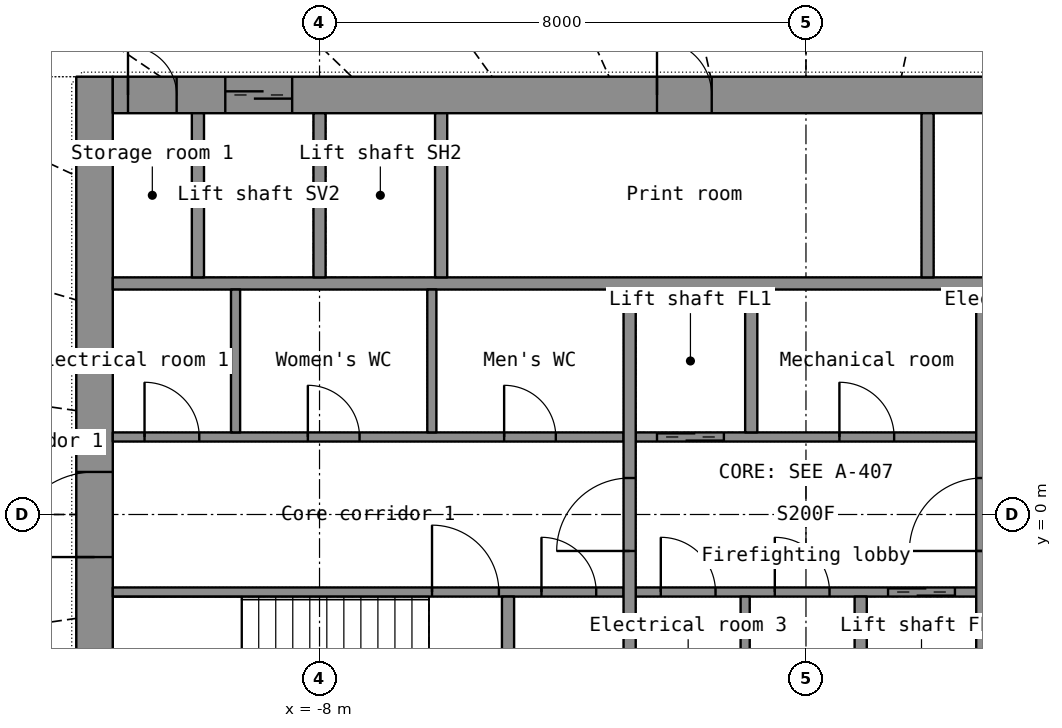
"""IFC4 building model, lengths in metres.
Left out: names, types, materials, properties, quantities, classifications, styles, units other than length and angle.
Written with IfcOpenShell. Run it as: python <this file> out.ifc"""

import sys

from ifc_helpers import new_model, si_unit, direction, frame, frame_2d, origin, place, context, subcontext, project, spatial, rectangle, extrude, element, fill, save


model = new_model("IFC4")
c1 = context("Model", 3, precision=1e-05, world=origin(), true_north=direction((0.0, 1.0)))
c2 = subcontext(c1, "Body", "Model", "MODEL_VIEW")
j1 = project(units=[si_unit("LENGTHUNIT", "METRE"), si_unit("PLANEANGLEUNIT", "RADIAN")], contexts=[c1])
p1 = place(None, origin())
s1 = spatial("IfcSite", under=j1, at=p1, CompositionType="ELEMENT")
p2 = place(p1, origin())
s2 = spatial("IfcBuilding", under=s1, at=p2, CompositionType="ELEMENT")
p3 = place(p2, frame((0.0, 0.0, 32.9)))
s3 = spatial("IfcBuildingStorey", under=s2, at=p3, CompositionType="ELEMENT", Elevation=32.9)
p4 = place(p3, frame((-11.7, -7.2, 0.0), z_axis=(0.0, 0.0, 1.0), x_axis=(0.0, 1.0, 0.0)))
e1 = element("IfcWall", 1, at=p4, inside=s3, PredefinedType="SHEAR", context=c2, shape_type="SweptSolid", body=[
    extrude(rectangle(XDim=14.4, YDim=0.6, at=frame_2d((7.2, 0.0))), origin(), (0.0, 0.0, 1.0), 3.8),
])
p5 = place(p4, frame((6.5, 0.0, 0.0)))
e2 = element("IfcOpeningElement", 2, at=p5, cuts=e1, PredefinedType="OPENING", context=c2, shape_type="SweptSolid", body=[
    extrude(rectangle(XDim=1.4, YDim=2.2, at=frame_2d((0.7, 1.1))), frame((0.0, 0.31, 0.0), z_axis=(0.0, -1.0, 0.0), x_axis=(1.0, 0.0, 0.0)), (0.0, 0.0, 1.0), 0.62),
])
p6 = place(p3, frame((-11.4, 6.9, 0.0), z_axis=(0.0, 0.0, 1.0), x_axis=(1.0, 0.0, 0.0)))
e3 = element("IfcWall", 3, at=p6, inside=s3, PredefinedType="SHEAR", context=c2, shape_type="SweptSolid", body=[
    extrude(rectangle(XDim=22.8, YDim=0.6, at=frame_2d((11.4, 0.0))), origin(), (0.0, 0.0, 1.0), 3.8),
])
p7 = place(p6, frame((1.85, 0.0, 0.0)))
e4 = element("IfcOpeningElement", 4, at=p7, cuts=e3, PredefinedType="OPENING", context=c2, shape_type="SweptSolid", body=[
    extrude(rectangle(XDim=1.1, YDim=2.2, at=frame_2d((0.55, 1.1))), frame((0.0, 0.31, 0.0), z_axis=(0.0, -1.0, 0.0), x_axis=(1.0, 0.0, 0.0)), (0.0, 0.0, 1.0), 0.62),
])
p8 = place(p6, frame((8.95, 0.0, 0.0)))
e5 = element("IfcOpeningElement", 5, at=p8, cuts=e3, PredefinedType="OPENING", context=c2, shape_type="SweptSolid", body=[
    extrude(rectangle(XDim=0.9, YDim=2.1, at=frame_2d((0.45, 1.05))), frame((0.0, 0.31, 0.0), z_axis=(0.0, -1.0, 0.0), x_axis=(1.0, 0.0, 0.0)), (0.0, 0.0, 1.0), 0.62),
])
p9 = place(p6, frame((16.95, 0.0, 0.0)))
e6 = element("IfcOpeningElement", 6, at=p9, cuts=e3, PredefinedType="OPENING", context=c2, shape_type="SweptSolid", body=[
    extrude(rectangle(XDim=0.9, YDim=2.1, at=frame_2d((0.45, 1.05))), frame((0.0, 0.31, 0.0), z_axis=(0.0, -1.0, 0.0), x_axis=(1.0, 0.0, 0.0)), (0.0, 0.0, 1.0), 0.62),
])
p10 = place(p6, frame((0.25, 0.0, 0.0)))
e7 = element("IfcOpeningElement", 7, at=p10, cuts=e3, PredefinedType="OPENING", context=c2, shape_type="SweptSolid", body=[
    extrude(rectangle(XDim=0.8, YDim=2.05, at=frame_2d((0.4, 1.025))), frame((0.0, 0.31, 0.0), z_axis=(0.0, -1.0, 0.0), x_axis=(1.0, 0.0, 0.0)), (0.0, 0.0, 1.0), 0.62),
])
p11 = place(p6, frame((21.75, 0.0, 0.0)))
e8 = element("IfcOpeningElement", 8, at=p11, cuts=e3, PredefinedType="OPENING", context=c2, shape_type="SweptSolid", body=[
    extrude(rectangle(XDim=0.8, YDim=2.05, at=frame_2d((0.4, 1.025))), frame((0.0, 0.31, 0.0), z_axis=(0.0, -1.0, 0.0), x_axis=(1.0, 0.0, 0.0)), (0.0, 0.0, 1.0), 0.62),
])
p12 = place(p3, frame((-11.4, 3.8, 0.0), z_axis=(0.0, 0.0, 1.0), x_axis=(1.0, 0.0, 0.0)))
e9 = element("IfcWall", 9, at=p12, inside=s3, PredefinedType="SHEAR", context=c2, shape_type="SweptSolid", body=[
    extrude(rectangle(XDim=22.8, YDim=0.2, at=frame_2d((11.4, 0.0))), origin(), (0.0, 0.0, 1.0), 3.8),
])
for number, where, z_axis, x_axis in (
    (10, (-10.0, 3.9, 0.0), (0.0, 0.0, 1.0), (0.0, 1.0, 0.0)),
    (11, (-8.0, 3.9, 0.0), (0.0, 0.0, 1.0), (0.0, 1.0, 0.0)),
    (12, (-6.0, 3.9, 0.0), (0.0, 0.0, 1.0), (0.0, 1.0, 0.0)),
):
    element("IfcWall", number, at=place(p3, frame(where, z_axis=z_axis, x_axis=x_axis)), inside=s3, PredefinedType="SHEAR", context=c2, shape_type="SweptSolid", body=[
        extrude(rectangle(XDim=2.7, YDim=0.2, at=frame_2d((1.35, 0.0))), origin(), (0.0, 0.0, 1.0), 3.8),
    ])
p13 = place(p3, frame((2.0, 3.9, 0.0), z_axis=(0.0, 0.0, 1.0), x_axis=(0.0, 1.0, 0.0)))
e13 = element("IfcWall", 13, at=p13, inside=s3, PredefinedType="PARTITIONING", context=c2, shape_type="SweptSolid", body=[
    extrude(rectangle(XDim=2.7, YDim=0.2, at=frame_2d((1.35, 0.0))), origin(), (0.0, 0.0, 1.0), 3.8),
])
p14 = place(p3, frame((-11.4, -1.275, 0.0), z_axis=(0.0, 0.0, 1.0), x_axis=(1.0, 0.0, 0.0)))
e14 = element("IfcWall", 14, at=p14, inside=s3, PredefinedType="SHEAR", context=c2, shape_type="SweptSolid", body=[
    extrude(rectangle(XDim=8.4, YDim=0.15, at=frame_2d((4.2, 0.0))), origin(), (0.0, 0.0, 1.0), 3.8),
])
p15 = place(p14, frame((5.25, 0.0, 0.0)))
e15 = element("IfcOpeningElement", 15, at=p15, cuts=e14, PredefinedType="OPENING", context=c2, shape_type="SweptSolid", body=[
    extrude(rectangle(XDim=1.1, YDim=2.15, at=frame_2d((0.55, 1.075))), frame((0.0, 0.085, 0.0), z_axis=(0.0, -1.0, 0.0), x_axis=(1.0, 0.0, 0.0)), (0.0, 0.0, 1.0), 0.17),
])
p16 = place(p14, frame((7.05, 0.0, 0.0)))
e16 = element("IfcOpeningElement", 16, at=p16, cuts=e14, PredefinedType="OPENING", context=c2, shape_type="SweptSolid", body=[
    extrude(rectangle(XDim=0.9, YDim=2.1, at=frame_2d((0.45, 1.05))), frame((0.0, 0.085, 0.0), z_axis=(0.0, -1.0, 0.0), x_axis=(1.0, 0.0, 0.0)), (0.0, 0.0, 1.0), 0.17),
])
p17 = place(p3, frame((-2.8, -1.275, 0.0), z_axis=(0.0, 0.0, 1.0), x_axis=(1.0, 0.0, 0.0)))
e17 = element("IfcWall", 17, at=p17, inside=s3, PredefinedType="SHEAR", context=c2, shape_type="SweptSolid", body=[
    extrude(rectangle(XDim=5.6, YDim=0.15, at=frame_2d((2.8, 0.0))), origin(), (0.0, 0.0, 1.0), 3.8),
])
p18 = place(p17, frame((4.15, 0.0, 0.0)))
e18 = element("IfcOpeningElement", 18, at=p18, cuts=e17, PredefinedType="OPENING", context=c2, shape_type="SweptSolid", body=[
    extrude(rectangle(XDim=1.1, YDim=2.2, at=frame_2d((0.55, 1.1))), frame((0.0, 0.085, 0.0), z_axis=(0.0, -1.0, 0.0), x_axis=(1.0, 0.0, 0.0)), (0.0, 0.0, 1.0), 0.17),
])
p19 = place(p17, frame((0.413, 0.0, 0.0)))
e19 = element("IfcOpeningElement", 19, at=p19, cuts=e17, PredefinedType="OPENING", context=c2, shape_type="SweptSolid", body=[
    extrude(rectangle(XDim=0.9, YDim=2.1, at=frame_2d((0.45, 1.05))), frame((0.0, 0.085, 0.0), z_axis=(0.0, -1.0, 0.0), x_axis=(1.0, 0.0, 0.0)), (0.0, 0.0, 1.0), 0.17),
])
p20 = place(p17, frame((2.288, 0.0, 0.0)))
e20 = element("IfcOpeningElement", 20, at=p20, cuts=e17, PredefinedType="OPENING", context=c2, shape_type="SweptSolid", body=[
    extrude(rectangle(XDim=0.9, YDim=2.1, at=frame_2d((0.45, 1.05))), frame((0.0, 0.085, 0.0), z_axis=(0.0, -1.0, 0.0), x_axis=(1.0, 0.0, 0.0)), (0.0, 0.0, 1.0), 0.17),
])
p21 = place(p3, frame((-11.4, 1.275, 0.0), z_axis=(0.0, 0.0, 1.0), x_axis=(1.0, 0.0, 0.0)))
e21 = element("IfcWall", 21, at=p21, inside=s3, PredefinedType="PARTITIONING", context=c2, shape_type="SweptSolid", body=[
    extrude(rectangle(XDim=8.4, YDim=0.15, at=frame_2d((4.2, 0.0))), origin(), (0.0, 0.0, 1.0), 3.8),
])
p22 = place(p21, frame((0.522, 0.0, 0.0)))
e22 = element("IfcOpeningElement", 22, at=p22, cuts=e21, PredefinedType="OPENING", context=c2, shape_type="SweptSolid", body=[
    extrude(rectangle(XDim=0.9, YDim=2.1, at=frame_2d((0.45, 1.05))), frame((0.0, 0.085, 0.0), z_axis=(0.0, -1.0, 0.0), x_axis=(1.0, 0.0, 0.0)), (0.0, 0.0, 1.0), 0.17),
])
p23 = place(p21, frame((3.208, 0.0, 0.0)))
e23 = element("IfcOpeningElement", 23, at=p23, cuts=e21, PredefinedType="OPENING", context=c2, shape_type="SweptSolid", body=[
    extrude(rectangle(XDim=0.85, YDim=2.1, at=frame_2d((0.425, 1.05))), frame((0.0, 0.085, 0.0), z_axis=(0.0, -1.0, 0.0), x_axis=(1.0, 0.0, 0.0)), (0.0, 0.0, 1.0), 0.17),
])
p24 = place(p21, frame((6.436, 0.0, 0.0)))
e24 = element("IfcOpeningElement", 24, at=p24, cuts=e21, PredefinedType="OPENING", context=c2, shape_type="SweptSolid", body=[
    extrude(rectangle(XDim=0.85, YDim=2.1, at=frame_2d((0.425, 1.05))), frame((0.0, 0.085, 0.0), z_axis=(0.0, -1.0, 0.0), x_axis=(1.0, 0.0, 0.0)), (0.0, 0.0, 1.0), 0.17),
])
p25 = place(p3, frame((-2.8, 1.275, 0.0), z_axis=(0.0, 0.0, 1.0), x_axis=(1.0, 0.0, 0.0)))
e25 = element("IfcWall", 25, at=p25, inside=s3, PredefinedType="SHEAR", context=c2, shape_type="SweptSolid", body=[
    extrude(rectangle(XDim=5.6, YDim=0.15, at=frame_2d((2.8, 0.0))), origin(), (0.0, 0.0, 1.0), 3.8),
])
p26 = place(p25, frame((0.35, 0.0, 0.0)))
e26 = element("IfcOpeningElement", 26, at=p26, cuts=e25, PredefinedType="OPENING", context=c2, shape_type="SweptSolid", body=[
    extrude(rectangle(XDim=1.1, YDim=2.2, at=frame_2d((0.55, 1.1))), frame((0.0, 0.085, 0.0), z_axis=(0.0, -1.0, 0.0), x_axis=(1.0, 0.0, 0.0)), (0.0, 0.0, 1.0), 0.17),
])
p27 = place(p25, frame((3.35, 0.0, 0.0)))
e27 = element("IfcOpeningElement", 27, at=p27, cuts=e25, PredefinedType="OPENING", context=c2, shape_type="SweptSolid", body=[
    extrude(rectangle(XDim=0.9, YDim=2.1, at=frame_2d((0.45, 1.05))), frame((0.0, 0.085, 0.0), z_axis=(0.0, -1.0, 0.0), x_axis=(1.0, 0.0, 0.0)), (0.0, 0.0, 1.0), 0.17),
])
p28 = place(p3, frame((-2.9, -3.7, 0.0), z_axis=(0.0, 0.0, 1.0), x_axis=(0.0, 1.0, 0.0)))
e28 = element("IfcWall", 28, at=p28, inside=s3, PredefinedType="SHEAR", context=c2, shape_type="SweptSolid", body=[
    extrude(rectangle(XDim=7.4, YDim=0.2, at=frame_2d((3.7, 0.0))), origin(), (0.0, 0.0, 1.0), 3.8),
])
p29 = place(p28, frame((3.1, 0.0, 0.0)))
e29 = element("IfcOpeningElement", 29, at=p29, cuts=e28, PredefinedType="OPENING", context=c2, shape_type="SweptSolid", body=[
    extrude(rectangle(XDim=1.2, YDim=2.2, at=frame_2d((0.6, 1.1))), frame((0.0, 0.11, 0.0), z_axis=(0.0, -1.0, 0.0), x_axis=(1.0, 0.0, 0.0)), (0.0, 0.0, 1.0), 0.22),
])
p30 = place(p3, frame((2.9, -3.7, 0.0), z_axis=(0.0, 0.0, 1.0), x_axis=(0.0, 1.0, 0.0)))
e30 = element("IfcWall", 30, at=p30, inside=s3, PredefinedType="SHEAR", context=c2, shape_type="SweptSolid", body=[
    extrude(rectangle(XDim=7.4, YDim=0.2, at=frame_2d((3.7, 0.0))), origin(), (0.0, 0.0, 1.0), 3.8),
])
p31 = place(p30, frame((3.1, 0.0, 0.0)))
e31 = element("IfcOpeningElement", 31, at=p31, cuts=e30, PredefinedType="OPENING", context=c2, shape_type="SweptSolid", body=[
    extrude(rectangle(XDim=1.2, YDim=2.2, at=frame_2d((0.6, 1.1))), frame((0.0, 0.11, 0.0), z_axis=(0.0, -1.0, 0.0), x_axis=(1.0, 0.0, 0.0)), (0.0, 0.0, 1.0), 0.22),
])
for number, where, z_axis, x_axis in (
    (32, (-0.9, 1.35, 0.0), (0.0, 0.0, 1.0), (0.0, 1.0, 0.0)),
    (33, (0.9, -3.7, 0.0), (0.0, 0.0, 1.0), (0.0, 1.0, 0.0)),
    (34, (-4.9, -3.7, 0.0), (0.0, 0.0, 1.0), (0.0, 1.0, 0.0)),
):
    element("IfcWall", number, at=place(p3, frame(where, z_axis=z_axis, x_axis=x_axis)), inside=s3, PredefinedType="SHEAR", context=c2, shape_type="SweptSolid", body=[
        extrude(rectangle(XDim=2.35, YDim=0.2, at=frame_2d((1.175, 0.0))), origin(), (0.0, 0.0, 1.0), 3.8),
    ])
for number, where, z_axis, x_axis in (
    (35, (-9.381, 1.35, 0.0), (0.0, 0.0, 1.0), (0.0, 1.0, 0.0)),
    (36, (-6.153, 1.35, 0.0), (0.0, 0.0, 1.0), (0.0, 1.0, 0.0)),
    (37, (-1.0, -3.7, 0.0), (0.0, 0.0, 1.0), (0.0, 1.0, 0.0)),
):
    element("IfcWall", number, at=place(p3, frame(where, z_axis=z_axis, x_axis=x_axis)), inside=s3, PredefinedType="PARTITIONING", context=c2, shape_type="SweptSolid", body=[
        extrude(rectangle(XDim=2.35, YDim=0.15, at=frame_2d((1.175, 0.0))), origin(), (0.0, 0.0, 1.0), 3.8),
    ])
p32 = place(p7, origin())
e38 = element("IfcDoor", 38, at=p32, inside=s3, OperationType="DOUBLE_DOOR_SLIDING", PredefinedType="DOOR", context=c2, shape_type="SweptSolid", body=[
    extrude(rectangle(XDim=1.1, YDim=2.2, at=frame_2d((0.55, 1.1))), frame((0.0, 0.025, 0.0), z_axis=(0.0, -1.0, 0.0), x_axis=(1.0, 0.0, 0.0)), (0.0, 0.0, 1.0), 0.05),
])
fill(e4, e38)
p33 = place(p8, origin())
e39 = element("IfcDoor", 39, at=p33, inside=s3, OperationType="SINGLE_SWING_LEFT", PredefinedType="DOOR", context=c2, shape_type="SweptSolid", body=[
    extrude(rectangle(XDim=0.9, YDim=2.1, at=frame_2d((0.45, 1.05))), frame((0.0, 0.025, 0.0), z_axis=(0.0, -1.0, 0.0), x_axis=(1.0, 0.0, 0.0)), (0.0, 0.0, 1.0), 0.05),
])
fill(e5, e39)
p34 = place(p10, origin())
e40 = element("IfcDoor", 40, at=p34, inside=s3, OperationType="SINGLE_SWING_LEFT", PredefinedType="DOOR", context=c2, shape_type="SweptSolid", body=[
    extrude(rectangle(XDim=0.8, YDim=2.05, at=frame_2d((0.4, 1.025))), frame((0.0, 0.025, 0.0), z_axis=(0.0, -1.0, 0.0), x_axis=(1.0, 0.0, 0.0)), (0.0, 0.0, 1.0), 0.05),
])
fill(e7, e40)
p35 = place(p5, origin())
e41 = element("IfcDoor", 41, at=p35, inside=s3, OperationType="DOUBLE_DOOR_SINGLE_SWING", PredefinedType="DOOR", context=c2, shape_type="SweptSolid", body=[
    extrude(rectangle(XDim=1.4, YDim=2.2, at=frame_2d((0.7, 1.1))), frame((0.0, 0.025, 0.0), z_axis=(0.0, -1.0, 0.0), x_axis=(1.0, 0.0, 0.0)), (0.0, 0.0, 1.0), 0.05),
])
fill(e2, e41)
p36 = place(p29, origin())
e42 = element("IfcDoor", 42, at=p36, inside=s3, OperationType="SINGLE_SWING_LEFT", PredefinedType="DOOR", context=c2, shape_type="SweptSolid", body=[
    extrude(rectangle(XDim=1.2, YDim=2.2, at=frame_2d((0.6, 1.1))), frame((0.0, 0.025, 0.0), z_axis=(0.0, -1.0, 0.0), x_axis=(1.0, 0.0, 0.0)), (0.0, 0.0, 1.0), 0.05),
])
fill(e29, e42)
p37 = place(p31, origin())
e43 = element("IfcDoor", 43, at=p37, inside=s3, OperationType="SINGLE_SWING_LEFT", PredefinedType="DOOR", context=c2, shape_type="SweptSolid", body=[
    extrude(rectangle(XDim=1.2, YDim=2.2, at=frame_2d((0.6, 1.1))), frame((0.0, 0.025, 0.0), z_axis=(0.0, -1.0, 0.0), x_axis=(1.0, 0.0, 0.0)), (0.0, 0.0, 1.0), 0.05),
])
fill(e31, e43)
p38 = place(p26, origin())
e44 = element("IfcDoor", 44, at=p38, inside=s3, OperationType="DOUBLE_DOOR_SLIDING", PredefinedType="DOOR", context=c2, shape_type="SweptSolid", body=[
    extrude(rectangle(XDim=1.1, YDim=2.2, at=frame_2d((0.55, 1.1))), frame((0.0, 0.025, 0.0), z_axis=(0.0, -1.0, 0.0), x_axis=(1.0, 0.0, 0.0)), (0.0, 0.0, 1.0), 0.05),
])
fill(e26, e44)
p39 = place(p18, origin())
e45 = element("IfcDoor", 45, at=p39, inside=s3, OperationType="DOUBLE_DOOR_SLIDING", PredefinedType="DOOR", context=c2, shape_type="SweptSolid", body=[
    extrude(rectangle(XDim=1.1, YDim=2.2, at=frame_2d((0.55, 1.1))), frame((0.0, 0.025, 0.0), z_axis=(0.0, -1.0, 0.0), x_axis=(1.0, 0.0, 0.0)), (0.0, 0.0, 1.0), 0.05),
])
fill(e18, e45)
p40 = place(p15, origin())
e46 = element("IfcDoor", 46, at=p40, inside=s3, OperationType="SINGLE_SWING_LEFT", PredefinedType="DOOR", context=c2, shape_type="SweptSolid", body=[
    extrude(rectangle(XDim=1.1, YDim=2.15, at=frame_2d((0.55, 1.075))), frame((0.0, 0.025, 0.0), z_axis=(0.0, -1.0, 0.0), x_axis=(1.0, 0.0, 0.0)), (0.0, 0.0, 1.0), 0.05),
])
fill(e15, e46)
p41 = place(p22, origin())
e47 = element("IfcDoor", 47, at=p41, inside=s3, OperationType="SINGLE_SWING_LEFT", PredefinedType="DOOR", context=c2, shape_type="SweptSolid", body=[
    extrude(rectangle(XDim=0.9, YDim=2.1, at=frame_2d((0.45, 1.05))), frame((0.0, 0.025, 0.0), z_axis=(0.0, -1.0, 0.0), x_axis=(1.0, 0.0, 0.0)), (0.0, 0.0, 1.0), 0.05),
])
fill(e22, e47)
p42 = place(p23, origin())
e48 = element("IfcDoor", 48, at=p42, inside=s3, OperationType="SINGLE_SWING_LEFT", PredefinedType="DOOR", context=c2, shape_type="SweptSolid", body=[
    extrude(rectangle(XDim=0.85, YDim=2.1, at=frame_2d((0.425, 1.05))), frame((0.0, 0.025, 0.0), z_axis=(0.0, -1.0, 0.0), x_axis=(1.0, 0.0, 0.0)), (0.0, 0.0, 1.0), 0.05),
])
fill(e23, e48)
p43 = place(p24, origin())
e49 = element("IfcDoor", 49, at=p43, inside=s3, OperationType="SINGLE_SWING_LEFT", PredefinedType="DOOR", context=c2, shape_type="SweptSolid", body=[
    extrude(rectangle(XDim=0.85, YDim=2.1, at=frame_2d((0.425, 1.05))), frame((0.0, 0.025, 0.0), z_axis=(0.0, -1.0, 0.0), x_axis=(1.0, 0.0, 0.0)), (0.0, 0.0, 1.0), 0.05),
])
fill(e24, e49)
p44 = place(p27, origin())
e50 = element("IfcDoor", 50, at=p44, inside=s3, OperationType="SINGLE_SWING_LEFT", PredefinedType="DOOR", context=c2, shape_type="SweptSolid", body=[
    extrude(rectangle(XDim=0.9, YDim=2.1, at=frame_2d((0.45, 1.05))), frame((0.0, 0.025, 0.0), z_axis=(0.0, -1.0, 0.0), x_axis=(1.0, 0.0, 0.0)), (0.0, 0.0, 1.0), 0.05),
])
fill(e27, e50)
p45 = place(p19, origin())
e51 = element("IfcDoor", 51, at=p45, inside=s3, OperationType="SINGLE_SWING_LEFT", PredefinedType="DOOR", context=c2, shape_type="SweptSolid", body=[
    extrude(rectangle(XDim=0.9, YDim=2.1, at=frame_2d((0.45, 1.05))), frame((0.0, 0.025, 0.0), z_axis=(0.0, -1.0, 0.0), x_axis=(1.0, 0.0, 0.0)), (0.0, 0.0, 1.0), 0.05),
])
fill(e19, e51)
p46 = place(p20, origin())
e52 = element("IfcDoor", 52, at=p46, inside=s3, OperationType="SINGLE_SWING_LEFT", PredefinedType="DOOR", context=c2, shape_type="SweptSolid", body=[
    extrude(rectangle(XDim=0.9, YDim=2.1, at=frame_2d((0.45, 1.05))), frame((0.0, 0.025, 0.0), z_axis=(0.0, -1.0, 0.0), x_axis=(1.0, 0.0, 0.0)), (0.0, 0.0, 1.0), 0.05),
])
fill(e20, e52)
p47 = place(p16, origin())
e53 = element("IfcDoor", 53, at=p47, inside=s3, OperationType="SINGLE_SWING_LEFT", PredefinedType="DOOR", context=c2, shape_type="SweptSolid", body=[
    extrude(rectangle(XDim=0.9, YDim=2.1, at=frame_2d((0.45, 1.05))), frame((0.0, 0.025, 0.0), z_axis=(0.0, -1.0, 0.0), x_axis=(1.0, 0.0, 0.0)), (0.0, 0.0, 1.0), 0.05),
])
fill(e16, e53)
save(model, sys.argv[1])
